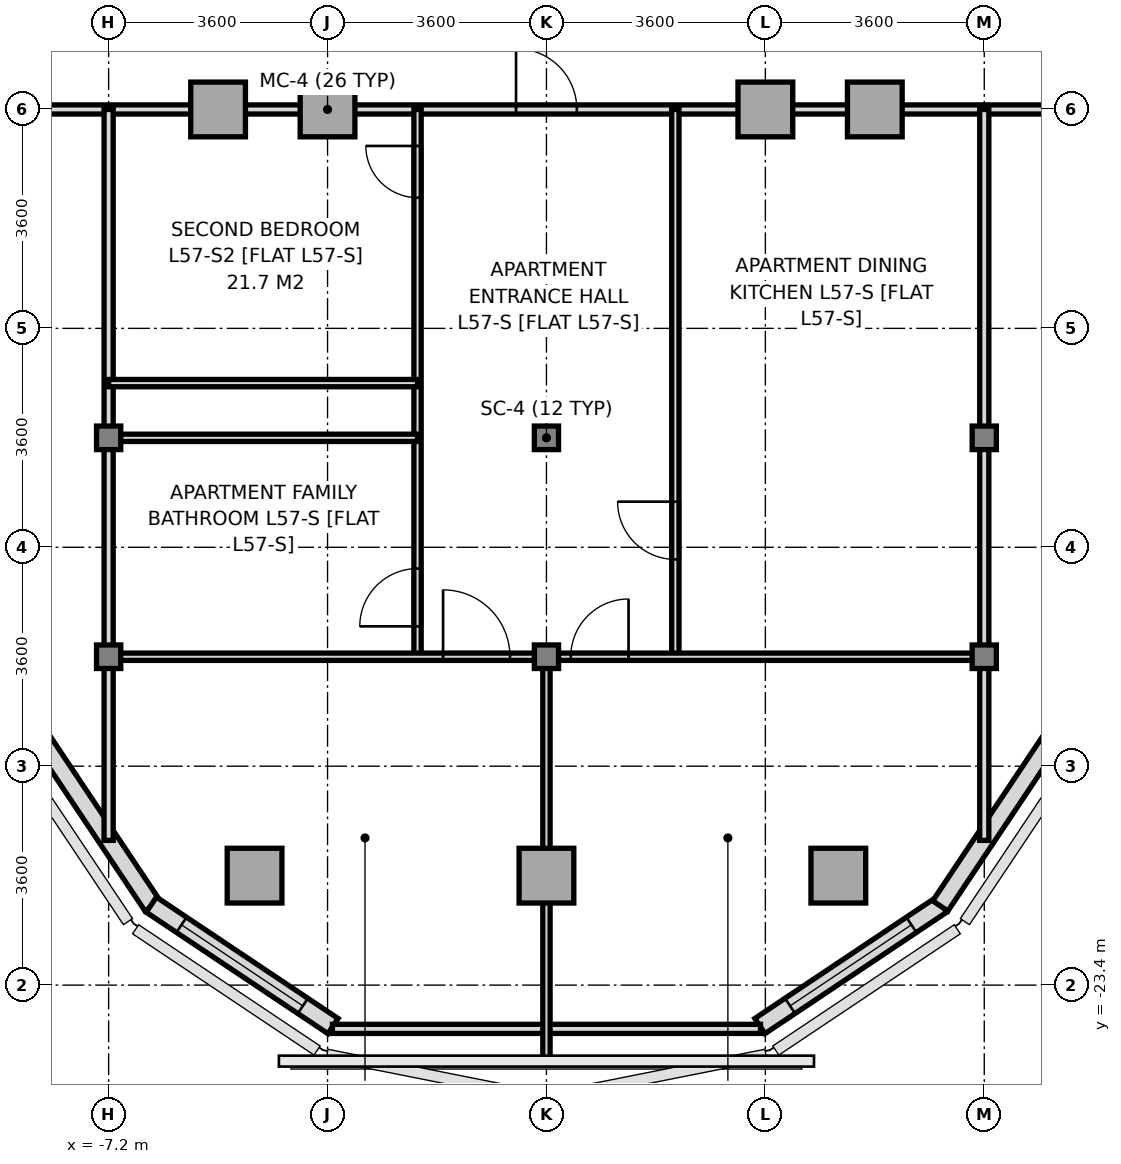
"""IFC4 building model, lengths in metres.
Left out: names, types, materials, properties, quantities, classifications, styles, units other than length and angle.
Written with IfcOpenShell. Run it as: python <this file> out.ifc"""

import sys

from ifc_helpers import new_model, si_unit, direction, frame, frame_2d, origin, origin_2d, place, context, subcontext, project, spatial, rectangle, i_section, extrude, source, transform, mapped, element, fill, save


model = new_model("IFC4")
c1 = context("Model", 3, precision=1e-05, world=origin(), true_north=direction((0.0, 1.0)))
c2 = subcontext(c1, "Body", "Model", "MODEL_VIEW")
j1 = project(units=[si_unit("LENGTHUNIT", "METRE"), si_unit("PLANEANGLEUNIT", "RADIAN")], contexts=[c1])
p1 = place(None, origin())
s1 = spatial("IfcSite", under=j1, at=p1, CompositionType="ELEMENT")
p2 = place(p1, origin())
s2 = spatial("IfcBuilding", under=s1, at=p2, CompositionType="ELEMENT")
p3 = place(p2, frame((0.0, 0.0, 208.0)))
s3 = spatial("IfcBuildingStorey", under=s2, at=p3, CompositionType="ELEMENT", Elevation=208.0)
m1 = source(origin(), c2, "Body", "SweptSolid", [
    extrude(i_section(OverallWidth=0.398, OverallDepth=0.387, WebThickness=0.018, FlangeThickness=0.028, at=origin_2d()), origin(), (0.0, 0.0, 1.0), 3.2),
])
for number, where, z_axis, x_axis in (
    (1, (-7.2, -18.0, 0.0), (0.0, 0.0, 1.0), (1.0, 0.0, 0.0)),
    (2, (-7.2, -14.4, 0.0), (0.0, 0.0, 1.0), (1.0, 0.0, 0.0)),
):
    element("IfcColumn", number, at=place(p3, frame(where, z_axis=z_axis, x_axis=x_axis)), inside=s3, PredefinedType="COLUMN", context=c2, shape_type="MappedRepresentation", body=[
        mapped(m1, transform((0.0, 0.0, 0.0), x_axis=(1.0, 0.0, 0.0), y_axis=(0.0, 1.0, 0.0), z_axis=(0.0, 0.0, 1.0), scale=1.0)),
    ])
m2 = source(origin(), c2, "Body", "SweptSolid", [
    extrude(rectangle(XDim=0.9, YDim=0.9, at=origin_2d()), origin(), (0.0, 0.0, 1.0), 3.2),
])
for number, where, z_axis, x_axis in (
    (3, (-5.4, -9.0, 0.0), (0.0, 0.0, 1.0), (1.0, 0.0, 0.0)),
    (4, (-4.8, -21.6, 0.0), (0.0, 0.0, 1.0), (1.0, 0.0, 0.0)),
    (5, (-3.6, -9.0, 0.0), (0.0, 0.0, 1.0), (1.0, 0.0, 0.0)),
    (6, (0.0, -21.6, 0.0), (0.0, 0.0, 1.0), (1.0, 0.0, 0.0)),
):
    element("IfcColumn", number, at=place(p3, frame(where, z_axis=z_axis, x_axis=x_axis)), inside=s3, PredefinedType="COLUMN", context=c2, shape_type="MappedRepresentation", body=[
        mapped(m2, transform((0.0, 0.0, 0.0), x_axis=(1.0, 0.0, 0.0), y_axis=(0.0, 1.0, 0.0), z_axis=(0.0, 0.0, 1.0), scale=1.0)),
    ])
for number, where, z_axis, x_axis in (
    (7, (0.0, -18.0, 0.0), (0.0, 0.0, 1.0), (1.0, 0.0, 0.0)),
    (8, (0.0, -14.4, 0.0), (0.0, 0.0, 1.0), (1.0, 0.0, 0.0)),
):
    element("IfcColumn", number, at=place(p3, frame(where, z_axis=z_axis, x_axis=x_axis)), inside=s3, PredefinedType="COLUMN", context=c2, shape_type="MappedRepresentation", body=[
        mapped(m1, transform((0.0, 0.0, 0.0), x_axis=(1.0, 0.0, 0.0), y_axis=(0.0, 1.0, 0.0), z_axis=(0.0, 0.0, 1.0), scale=1.0)),
    ])
for number, where, z_axis, x_axis in (
    (9, (3.6, -9.0, 0.0), (0.0, 0.0, 1.0), (1.0, 0.0, 0.0)),
    (10, (4.8, -21.6, 0.0), (0.0, 0.0, 1.0), (1.0, 0.0, 0.0)),
    (11, (5.4, -9.0, 0.0), (0.0, 0.0, 1.0), (1.0, 0.0, 0.0)),
):
    element("IfcColumn", number, at=place(p3, frame(where, z_axis=z_axis, x_axis=x_axis)), inside=s3, PredefinedType="COLUMN", context=c2, shape_type="MappedRepresentation", body=[
        mapped(m2, transform((0.0, 0.0, 0.0), x_axis=(1.0, 0.0, 0.0), y_axis=(0.0, 1.0, 0.0), z_axis=(0.0, 0.0, 1.0), scale=1.0)),
    ])
for number, where, z_axis, x_axis in (
    (12, (7.2, -18.0, 0.0), (0.0, 0.0, 1.0), (1.0, 0.0, 0.0)),
    (13, (7.2, -14.4, 0.0), (0.0, 0.0, 1.0), (1.0, 0.0, 0.0)),
):
    element("IfcColumn", number, at=place(p3, frame(where, z_axis=z_axis, x_axis=x_axis)), inside=s3, PredefinedType="COLUMN", context=c2, shape_type="MappedRepresentation", body=[
        mapped(m1, transform((0.0, 0.0, 0.0), x_axis=(1.0, 0.0, 0.0), y_axis=(0.0, 1.0, 0.0), z_axis=(0.0, 0.0, 1.0), scale=1.0)),
    ])
p4 = place(p3, frame((-8.482, -19.097, 0.0), z_axis=(0.0, 0.0, 1.0), x_axis=(0.555574187116, -0.831466970246, 0.0)))
e14 = element("IfcWall", 14, at=p4, inside=s3, PredefinedType="SOLIDWALL", context=c2, shape_type="SweptSolid", body=[
    extrude(rectangle(XDim=3.609, YDim=0.3, at=frame_2d((1.804, 0.0))), origin(), (0.0, 0.0, 1.0), 3.2),
])
p5 = place(p3, frame((-6.498, -22.077, 0.0), z_axis=(0.0, 0.0, 1.0), x_axis=(0.8314749531, -0.555562239868, 0.0)))
e15 = element("IfcWall", 15, at=p5, inside=s3, PredefinedType="SOLIDWALL", context=c2, shape_type="SweptSolid", body=[
    extrude(rectangle(XDim=3.593, YDim=0.3, at=frame_2d((1.797, 0.0))), origin(), (0.0, 0.0, 1.0), 3.2),
])
p6 = place(p5, frame((0.597, 0.0, 0.8)))
e16 = element("IfcOpeningElement", 16, at=p6, cuts=e15, PredefinedType="OPENING", context=c2, shape_type="SweptSolid", body=[
    extrude(rectangle(XDim=2.4, YDim=2.2, at=frame_2d((1.2, 1.1))), frame((0.0, 0.16, 0.0), z_axis=(0.0, -1.0, 0.0), x_axis=(1.0, 0.0, 0.0)), (0.0, 0.0, 1.0), 0.32),
])
p7 = place(p3, frame((3.51, -24.073, 0.0), z_axis=(0.0, 0.0, 1.0), x_axis=(0.8314749531, 0.555562239868, 0.0)))
e17 = element("IfcWall", 17, at=p7, inside=s3, PredefinedType="SOLIDWALL", context=c2, shape_type="SweptSolid", body=[
    extrude(rectangle(XDim=3.593, YDim=0.3, at=frame_2d((1.797, 0.0))), origin(), (0.0, 0.0, 1.0), 3.2),
])
p8 = place(p7, frame((0.597, 0.0, 0.8)))
e18 = element("IfcOpeningElement", 18, at=p8, cuts=e17, PredefinedType="OPENING", context=c2, shape_type="SweptSolid", body=[
    extrude(rectangle(XDim=2.4, YDim=2.2, at=frame_2d((1.2, 1.1))), frame((0.0, 0.16, 0.0), z_axis=(0.0, -1.0, 0.0), x_axis=(1.0, 0.0, 0.0)), (0.0, 0.0, 1.0), 0.32),
])
p9 = place(p3, frame((6.477, -22.098, 0.0), z_axis=(0.0, 0.0, 1.0), x_axis=(0.555574187116, 0.831466970246, 0.0)))
e19 = element("IfcWall", 19, at=p9, inside=s3, PredefinedType="SOLIDWALL", context=c2, shape_type="SweptSolid", body=[
    extrude(rectangle(XDim=3.609, YDim=0.3, at=frame_2d((1.804, 0.0))), origin(), (0.0, 0.0, 1.0), 3.2),
])
p10 = place(p3, frame((-9.55, -9.0, 0.0), z_axis=(0.0, 0.0, 1.0), x_axis=(1.0, 0.0, 0.0)))
e20 = element("IfcWall", 20, at=p10, inside=s3, PredefinedType="PARTITIONING", context=c2, shape_type="SweptSolid", body=[
    extrude(rectangle(XDim=19.1, YDim=0.15, at=frame_2d((9.55, 0.0))), origin(), (0.0, 0.0, 1.0), 2.75),
])
p11 = place(p10, frame((9.05, 0.0, 0.0)))
e21 = element("IfcOpeningElement", 21, at=p11, cuts=e20, PredefinedType="OPENING", context=c2, shape_type="SweptSolid", body=[
    extrude(rectangle(XDim=1.0, YDim=2.2, at=frame_2d((0.5, 1.1))), frame((0.0, 0.085, 0.0), z_axis=(0.0, -1.0, 0.0), x_axis=(1.0, 0.0, 0.0)), (0.0, 0.0, 1.0), 0.17),
])
for number, where, z_axis, x_axis in (
    (22, (-7.2, -21.02, 0.0), (0.0, 0.0, 1.0), (0.0, 1.0, 0.0)),
    (23, (7.2, -21.02, 0.0), (0.0, 0.0, 1.0), (0.0, 1.0, 0.0)),
):
    element("IfcWall", number, at=place(p3, frame(where, z_axis=z_axis, x_axis=x_axis)), inside=s3, PredefinedType="PARTITIONING", context=c2, shape_type="SweptSolid", body=[
        extrude(rectangle(XDim=12.02, YDim=0.15, at=frame_2d((6.01, 0.0))), origin(), (0.0, 0.0, 1.0), 2.75),
    ])
p12 = place(p3, frame((-3.52, -24.12, 0.0), z_axis=(0.0, 0.0, 1.0), x_axis=(1.0, 0.0, 0.0)))
e24 = element("IfcWall", 24, at=p12, inside=s3, PredefinedType="PARTITIONING", context=c2, shape_type="SweptSolid", body=[
    extrude(rectangle(XDim=7.04, YDim=0.15, at=frame_2d((3.52, 0.0))), origin(), (0.0, 0.0, 1.0), 3.2),
])
p13 = place(p3, frame((-2.12, -18.0, 0.0), z_axis=(0.0, 0.0, 1.0), x_axis=(0.0, 1.0, 0.0)))
e25 = element("IfcWall", 25, at=p13, inside=s3, PredefinedType="PARTITIONING", context=c2, shape_type="SweptSolid", body=[
    extrude(rectangle(XDim=9.0, YDim=0.12, at=frame_2d((4.5, 0.0))), origin(), (0.0, 0.0, 1.0), 2.75),
])
p14 = place(p13, frame((7.55, 0.0, 0.0)))
e26 = element("IfcOpeningElement", 26, at=p14, cuts=e25, PredefinedType="OPENING", context=c2, shape_type="SweptSolid", body=[
    extrude(rectangle(XDim=0.85, YDim=2.1, at=frame_2d((0.425, 1.05))), frame((0.0, 0.07, 0.0), z_axis=(0.0, -1.0, 0.0), x_axis=(1.0, 0.0, 0.0)), (0.0, 0.0, 1.0), 0.14),
])
p15 = place(p13, frame((0.5, 0.0, 0.0)))
e27 = element("IfcOpeningElement", 27, at=p15, cuts=e25, PredefinedType="OPENING", context=c2, shape_type="SweptSolid", body=[
    extrude(rectangle(XDim=0.95, YDim=2.15, at=frame_2d((0.475, 1.075))), frame((0.0, 0.07, 0.0), z_axis=(0.0, -1.0, 0.0), x_axis=(1.0, 0.0, 0.0)), (0.0, 0.0, 1.0), 0.14),
])
p16 = place(p3, frame((-7.2, -13.5, 0.0), z_axis=(0.0, 0.0, 1.0), x_axis=(1.0, 0.0, 0.0)))
e28 = element("IfcWall", 28, at=p16, inside=s3, PredefinedType="PARTITIONING", context=c2, shape_type="SweptSolid", body=[
    extrude(rectangle(XDim=5.08, YDim=0.12, at=frame_2d((2.54, 0.0))), origin(), (0.0, 0.0, 1.0), 3.2),
])
p17 = place(p3, frame((2.12, -18.0, 0.0), z_axis=(0.0, 0.0, 1.0), x_axis=(0.0, 1.0, 0.0)))
e29 = element("IfcWall", 29, at=p17, inside=s3, PredefinedType="PARTITIONING", context=c2, shape_type="SweptSolid", body=[
    extrude(rectangle(XDim=9.0, YDim=0.12, at=frame_2d((4.5, 0.0))), origin(), (0.0, 0.0, 1.0), 2.75),
])
p18 = place(p17, frame((1.6, 0.0, 0.0)))
e30 = element("IfcOpeningElement", 30, at=p18, cuts=e29, PredefinedType="OPENING", context=c2, shape_type="SweptSolid", body=[
    extrude(rectangle(XDim=0.95, YDim=2.15, at=frame_2d((0.475, 1.075))), frame((0.0, 0.07, 0.0), z_axis=(0.0, -1.0, 0.0), x_axis=(1.0, 0.0, 0.0)), (0.0, 0.0, 1.0), 0.14),
])
p19 = place(p3, frame((-7.2, -18.0, 0.0), z_axis=(0.0, 0.0, 1.0), x_axis=(1.0, 0.0, 0.0)))
e31 = element("IfcWall", 31, at=p19, inside=s3, PredefinedType="PARTITIONING", context=c2, shape_type="SweptSolid", body=[
    extrude(rectangle(XDim=14.4, YDim=0.12, at=frame_2d((7.2, 0.0))), origin(), (0.0, 0.0, 1.0), 2.75),
])
p20 = place(p19, frame((5.5, 0.0, 0.0)))
e32 = element("IfcOpeningElement", 32, at=p20, cuts=e31, PredefinedType="OPENING", context=c2, shape_type="SweptSolid", body=[
    extrude(rectangle(XDim=1.1, YDim=2.2, at=frame_2d((0.55, 1.1))), frame((0.0, 0.07, 0.0), z_axis=(0.0, -1.0, 0.0), x_axis=(1.0, 0.0, 0.0)), (0.0, 0.0, 1.0), 0.14),
])
p21 = place(p19, frame((7.6, 0.0, 0.0)))
e33 = element("IfcOpeningElement", 33, at=p21, cuts=e31, PredefinedType="OPENING", context=c2, shape_type="SweptSolid", body=[
    extrude(rectangle(XDim=0.95, YDim=2.15, at=frame_2d((0.475, 1.075))), frame((0.0, 0.07, 0.0), z_axis=(0.0, -1.0, 0.0), x_axis=(1.0, 0.0, 0.0)), (0.0, 0.0, 1.0), 0.14),
])
p22 = place(p3, frame((0.0, -24.65, 0.0), z_axis=(0.0, 0.0, 1.0), x_axis=(0.0, 1.0, 0.0)))
e34 = element("IfcWall", 34, at=p22, inside=s3, PredefinedType="PARTITIONING", context=c2, shape_type="SweptSolid", body=[
    extrude(rectangle(XDim=6.65, YDim=0.12, at=frame_2d((3.325, 0.0))), origin(), (0.0, 0.0, 1.0), 2.75),
])
p23 = place(p3, frame((-7.2, -14.4, 0.0), z_axis=(0.0, 0.0, 1.0), x_axis=(1.0, 0.0, 0.0)))
e35 = element("IfcWall", 35, at=p23, inside=s3, PredefinedType="PARTITIONING", context=c2, shape_type="SweptSolid", body=[
    extrude(rectangle(XDim=5.08, YDim=0.12, at=frame_2d((2.54, 0.0))), origin(), (0.0, 0.0, 1.0), 2.75),
])
m3 = source(origin(), c2, "Body", "SweptSolid", [
    extrude(rectangle(XDim=2.4, YDim=2.2, at=frame_2d((1.2, 1.1))), frame((0.0, 0.03, 0.0), z_axis=(0.0, -1.0, 0.0), x_axis=(1.0, 0.0, 0.0)), (0.0, 0.0, 1.0), 0.06),
])
p24 = place(p6, origin())
e36 = element("IfcWindow", 36, at=p24, inside=s3, PartitioningType="SINGLE_PANEL", PredefinedType="WINDOW", context=c2, shape_type="MappedRepresentation", body=[
    mapped(m3, transform((0.0, 0.0, 0.0), x_axis=(1.0, 0.0, 0.0), y_axis=(0.0, 1.0, 0.0), z_axis=(0.0, 0.0, 1.0), scale=1.0)),
])
fill(e16, e36)
p25 = place(p8, origin())
e37 = element("IfcWindow", 37, at=p25, inside=s3, PartitioningType="SINGLE_PANEL", PredefinedType="WINDOW", context=c2, shape_type="MappedRepresentation", body=[
    mapped(m3, transform((0.0, 0.0, 0.0), x_axis=(1.0, 0.0, 0.0), y_axis=(0.0, 1.0, 0.0), z_axis=(0.0, 0.0, 1.0), scale=1.0)),
])
fill(e18, e37)
m4 = source(origin(), c2, "Body", "SweptSolid", [
    extrude(rectangle(XDim=1.0, YDim=2.2, at=frame_2d((0.5, 1.1))), frame((0.0, 0.025, 0.0), z_axis=(0.0, -1.0, 0.0), x_axis=(1.0, 0.0, 0.0)), (0.0, 0.0, 1.0), 0.05),
])
p26 = place(p11, origin())
e38 = element("IfcDoor", 38, at=p26, inside=s3, OperationType="SINGLE_SWING_LEFT", PredefinedType="DOOR", context=c2, shape_type="MappedRepresentation", body=[
    mapped(m4, transform((0.0, 0.0, 0.0), x_axis=(1.0, 0.0, 0.0), y_axis=(0.0, 1.0, 0.0), z_axis=(0.0, 0.0, 1.0), scale=1.0)),
])
fill(e21, e38)
m5 = source(origin(), c2, "Body", "SweptSolid", [
    extrude(rectangle(XDim=0.85, YDim=2.1, at=frame_2d((0.425, 1.05))), frame((0.0, 0.025, 0.0), z_axis=(0.0, -1.0, 0.0), x_axis=(1.0, 0.0, 0.0)), (0.0, 0.0, 1.0), 0.05),
])
p27 = place(p14, origin())
e39 = element("IfcDoor", 39, at=p27, inside=s3, OperationType="SINGLE_SWING_RIGHT", PredefinedType="DOOR", context=c2, shape_type="MappedRepresentation", body=[
    mapped(m5, transform((0.0, 0.0, 0.0), x_axis=(1.0, 0.0, 0.0), y_axis=(0.0, 1.0, 0.0), z_axis=(0.0, 0.0, 1.0), scale=1.0)),
])
fill(e26, e39)
m6 = source(origin(), c2, "Body", "SweptSolid", [
    extrude(rectangle(XDim=0.95, YDim=2.15, at=frame_2d((0.475, 1.075))), frame((0.0, 0.025, 0.0), z_axis=(0.0, -1.0, 0.0), x_axis=(1.0, 0.0, 0.0)), (0.0, 0.0, 1.0), 0.05),
])
p28 = place(p15, origin())
e40 = element("IfcDoor", 40, at=p28, inside=s3, OperationType="SINGLE_SWING_LEFT", PredefinedType="DOOR", context=c2, shape_type="MappedRepresentation", body=[
    mapped(m6, transform((0.0, 0.0, 0.0), x_axis=(1.0, 0.0, 0.0), y_axis=(0.0, 1.0, 0.0), z_axis=(0.0, 0.0, 1.0), scale=1.0)),
])
fill(e27, e40)
p29 = place(p18, origin())
e41 = element("IfcDoor", 41, at=p29, inside=s3, OperationType="SINGLE_SWING_RIGHT", PredefinedType="DOOR", context=c2, shape_type="MappedRepresentation", body=[
    mapped(m6, transform((0.0, 0.0, 0.0), x_axis=(1.0, 0.0, 0.0), y_axis=(0.0, 1.0, 0.0), z_axis=(0.0, 0.0, 1.0), scale=1.0)),
])
fill(e30, e41)
m7 = source(origin(), c2, "Body", "SweptSolid", [
    extrude(rectangle(XDim=1.1, YDim=2.2, at=frame_2d((0.55, 1.1))), frame((0.0, 0.025, 0.0), z_axis=(0.0, -1.0, 0.0), x_axis=(1.0, 0.0, 0.0)), (0.0, 0.0, 1.0), 0.05),
])
p30 = place(p20, origin())
e42 = element("IfcDoor", 42, at=p30, inside=s3, OperationType="SINGLE_SWING_LEFT", PredefinedType="DOOR", context=c2, shape_type="MappedRepresentation", body=[
    mapped(m7, transform((0.0, 0.0, 0.0), x_axis=(1.0, 0.0, 0.0), y_axis=(0.0, 1.0, 0.0), z_axis=(0.0, 0.0, 1.0), scale=1.0)),
])
fill(e32, e42)
p31 = place(p21, origin())
e43 = element("IfcDoor", 43, at=p31, inside=s3, OperationType="SINGLE_SWING_RIGHT", PredefinedType="DOOR", context=c2, shape_type="MappedRepresentation", body=[
    mapped(m6, transform((0.0, 0.0, 0.0), x_axis=(1.0, 0.0, 0.0), y_axis=(0.0, 1.0, 0.0), z_axis=(0.0, 0.0, 1.0), scale=1.0)),
])
fill(e33, e43)
save(model, sys.argv[1])
